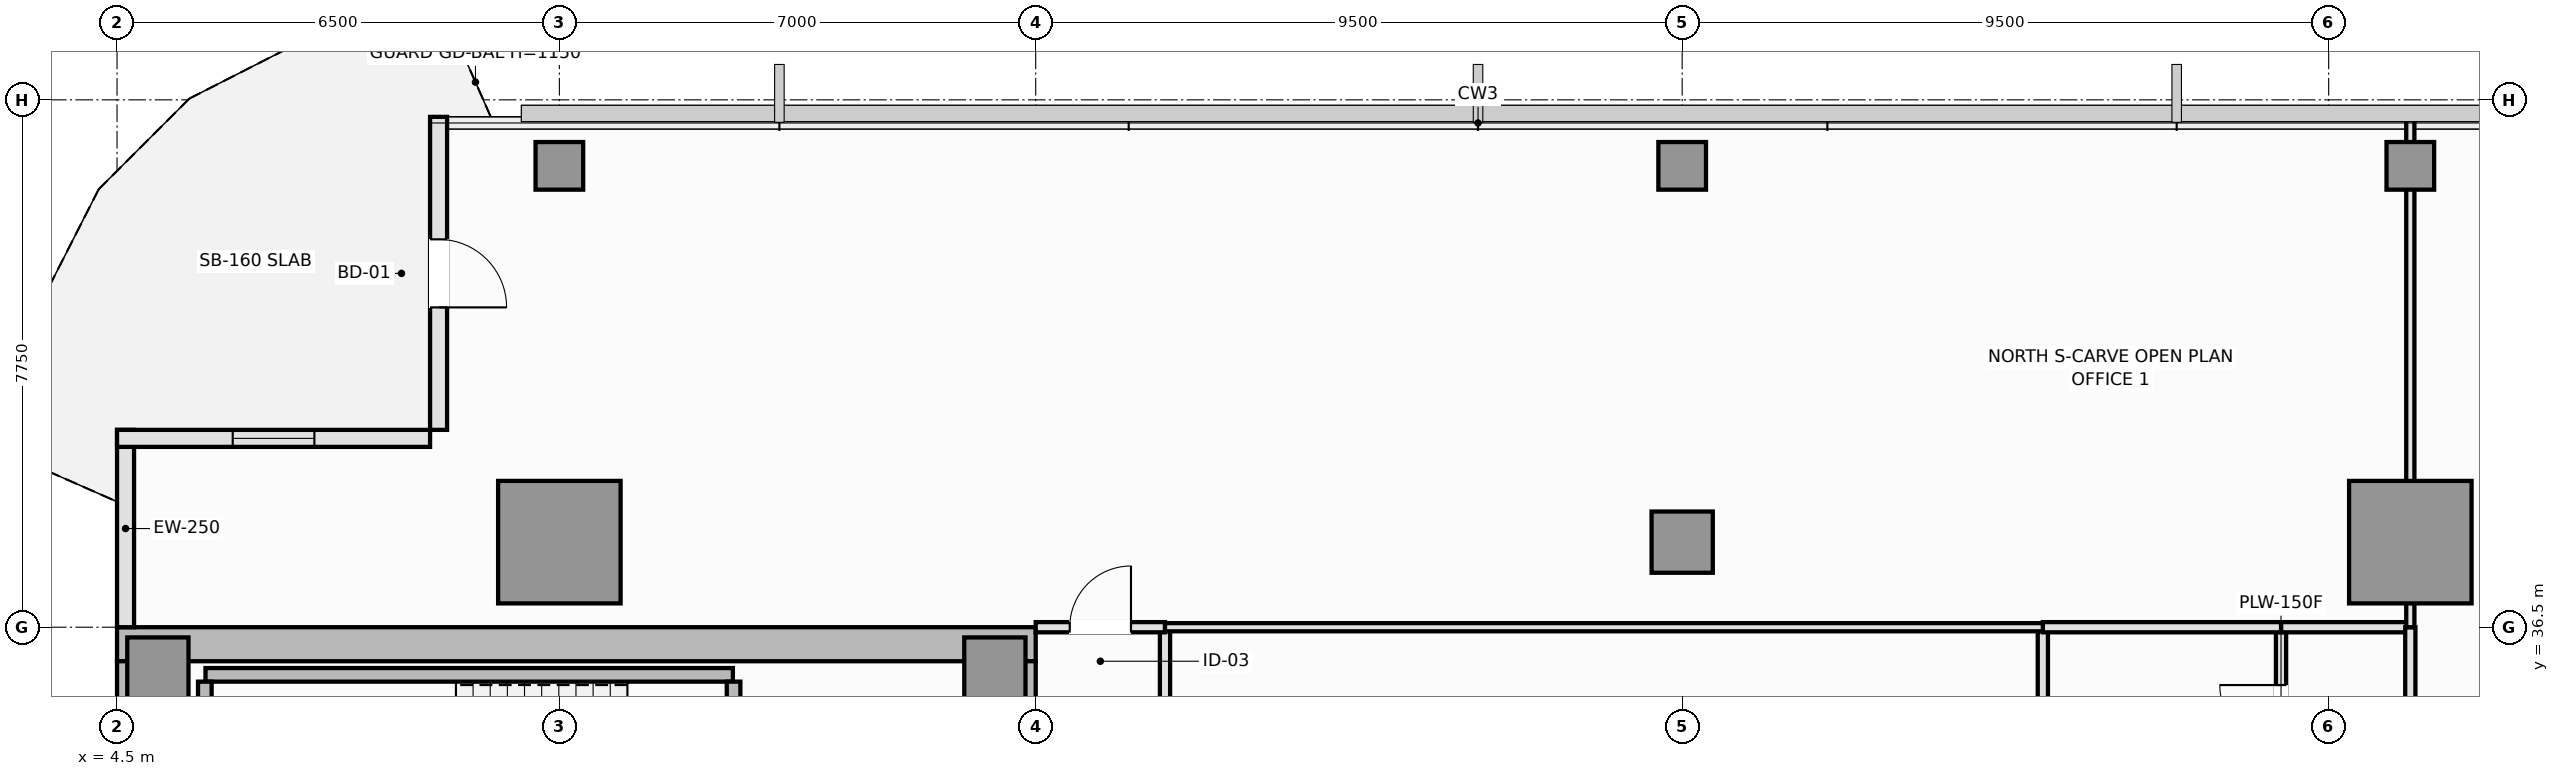
"""IFC4 building model, lengths in metres.
Left out: names, types, materials, properties, quantities, classifications, styles, units other than length and angle.
Written with IfcOpenShell. Run it as: python <this file> out.ifc"""

import sys

from ifc_helpers import new_model, si_unit, direction, frame, frame_2d, origin, origin_2d, place, context, subcontext, project, spatial, rectangle, extrude, element, fill, save


model = new_model("IFC4")
c1 = context("Model", 3, precision=1e-05, world=origin(), true_north=direction((0.0, 1.0)))
c2 = subcontext(c1, "Body", "Model", "MODEL_VIEW")
j1 = project(units=[si_unit("LENGTHUNIT", "METRE"), si_unit("PLANEANGLEUNIT", "RADIAN")], contexts=[c1])
p1 = place(None, origin())
s1 = spatial("IfcSite", under=j1, at=p1, CompositionType="ELEMENT")
p2 = place(p1, origin())
s2 = spatial("IfcBuilding", under=s1, at=p2, CompositionType="ELEMENT")
p3 = place(p2, frame((0.0, 0.0, 249.25)))
s3 = spatial("IfcBuildingStorey", under=s2, at=p3, CompositionType="ELEMENT", Elevation=249.25)
p4 = place(p3, frame((4.5, 36.25, 0.0), z_axis=(0.0, 0.0, 1.0), x_axis=(1.0, 0.0, 0.0)))
e1 = element("IfcWall", 1, at=p4, inside=s3, PredefinedType="SHEAR", context=c2, shape_type="SweptSolid", body=[
    extrude(rectangle(XDim=13.5, YDim=0.5, at=frame_2d((6.75, 0.0))), origin(), (0.0, 0.0, 1.0), 3.55),
])
p5 = place(p3, frame((4.75, 14.5, 0.0), z_axis=(0.0, 0.0, 1.0), x_axis=(0.0, 1.0, 0.0)))
e2 = element("IfcWall", 2, at=p5, inside=s3, PredefinedType="SHEAR", context=c2, shape_type="SweptSolid", body=[
    extrude(rectangle(XDim=21.5, YDim=0.5, at=frame_2d((10.75, 0.0))), origin(), (0.0, 0.0, 1.0), 3.55),
])
p6 = place(p3, frame((17.75, 27.05, 0.0), z_axis=(0.0, 0.0, 1.0), x_axis=(0.0, 1.0, 0.0)))
e3 = element("IfcWall", 3, at=p6, inside=s3, PredefinedType="SHEAR", context=c2, shape_type="SweptSolid", body=[
    extrude(rectangle(XDim=8.95, YDim=0.5, at=frame_2d((4.475, 0.0))), origin(), (0.0, 0.0, 1.0), 3.55),
])
p7 = place(p6, frame((3.45, 0.0, 0.0)))
e4 = element("IfcOpeningElement", 4, at=p7, cuts=e3, PredefinedType="OPENING", context=c2, shape_type="SweptSolid", body=[
    extrude(rectangle(XDim=1.1, YDim=2.15, at=frame_2d((0.55, 1.075))), frame((0.0, 0.26, 0.0), z_axis=(0.0, -1.0, 0.0), x_axis=(1.0, 0.0, 0.0)), (0.0, 0.0, 1.0), 0.52),
])
for number, where, z_axis, x_axis in (
    (5, (5.1, 35.9, 0.0), (0.0, 0.0, 1.0), (1.0, 0.0, 0.0)),
    (6, (17.4, 35.9, 0.0), (0.0, 0.0, 1.0), (1.0, 0.0, 0.0)),
):
    element("IfcColumn", number, at=place(p3, frame(where, z_axis=z_axis, x_axis=x_axis)), inside=s3, PredefinedType="PILASTER", context=c2, shape_type="SweptSolid", body=[
        extrude(rectangle(XDim=0.9, YDim=0.9, at=origin_2d()), origin(), (0.0, 0.0, 1.0), 3.55),
    ])
for number, where, z_axis, x_axis in (
    (7, (11.0, 37.75, 0.0), (0.0, 0.0, 1.0), (1.0, 0.0, 0.0)),
    (8, (38.2, 37.75, 0.0), (0.0, 0.0, 1.0), (1.0, 0.0, 0.0)),
):
    element("IfcColumn", number, at=place(p3, frame(where, z_axis=z_axis, x_axis=x_axis)), inside=s3, PredefinedType="COLUMN", context=c2, shape_type="SweptSolid", body=[
        extrude(rectangle(XDim=1.8, YDim=1.8, at=origin_2d()), origin(), (0.0, 0.0, 1.0), 3.55),
    ])
p8 = place(p3, frame((27.5, 37.75, 0.0), z_axis=(0.0, 0.0, 1.0), x_axis=(1.0, 0.0, 0.0)))
e9 = element("IfcColumn", 9, at=p8, inside=s3, PredefinedType="COLUMN", context=c2, shape_type="SweptSolid", body=[
    extrude(rectangle(XDim=0.9, YDim=0.9, at=origin_2d()), origin(), (0.0, 0.0, 1.0), 3.55),
])
for number, where, z_axis, x_axis in (
    (10, (11.0, 43.28, 0.0), (0.0, 0.0, 1.0), (1.0, 0.0, 0.0)),
    (11, (27.5, 43.28, 0.0), (0.0, 0.0, 1.0), (1.0, 0.0, 0.0)),
    (12, (38.2, 43.28, 0.0), (0.0, 0.0, 1.0), (1.0, 0.0, 0.0)),
):
    element("IfcColumn", number, at=place(p3, frame(where, z_axis=z_axis, x_axis=x_axis)), inside=s3, PredefinedType="COLUMN", context=c2, shape_type="SweptSolid", body=[
        extrude(rectangle(XDim=0.7, YDim=0.7, at=origin_2d()), origin(), (0.0, 0.0, 1.0), 3.55),
    ])
p9 = place(p3, frame((4.625, 39.4, 0.0), z_axis=(0.0, 0.0, 1.0), x_axis=(0.0, -1.0, 0.0)))
e13 = element("IfcWall", 13, at=p9, inside=s3, PredefinedType="SOLIDWALL", context=c2, shape_type="SweptSolid", body=[
    extrude(rectangle(XDim=2.9, YDim=0.25, at=frame_2d((1.45, 0.0))), origin(), (0.0, 0.0, 1.0), 3.39),
])
p10 = place(p3, frame((9.225, 44.0, 0.0), z_axis=(0.0, 0.0, 1.0), x_axis=(0.0, -1.0, 0.0)))
e14 = element("IfcWall", 14, at=p10, inside=s3, PredefinedType="SOLIDWALL", context=c2, shape_type="SweptSolid", body=[
    extrude(rectangle(XDim=4.6, YDim=0.25, at=frame_2d((2.3, 0.0))), origin(), (0.0, 0.0, 1.0), 3.39),
])
p11 = place(p10, frame((1.8, 0.0, 0.0)))
e15 = element("IfcOpeningElement", 15, at=p11, cuts=e14, PredefinedType="OPENING", context=c2, shape_type="SweptSolid", body=[
    extrude(rectangle(XDim=1.0, YDim=2.2, at=frame_2d((0.5, 1.1))), frame((0.0, 0.135, 0.0), z_axis=(0.0, -1.0, 0.0), x_axis=(1.0, 0.0, 0.0)), (0.0, 0.0, 1.0), 0.27),
])
p12 = place(p3, frame((9.1, 39.275, 0.0), z_axis=(0.0, 0.0, 1.0), x_axis=(-1.0, 0.0, 0.0)))
e16 = element("IfcWall", 16, at=p12, inside=s3, PredefinedType="SOLIDWALL", context=c2, shape_type="SweptSolid", body=[
    extrude(rectangle(XDim=4.6, YDim=0.25, at=frame_2d((2.3, 0.0))), origin(), (0.0, 0.0, 1.0), 3.12),
])
p13 = place(p12, frame((1.7, 0.0, 0.9)))
e17 = element("IfcOpeningElement", 17, at=p13, cuts=e16, PredefinedType="OPENING", context=c2, shape_type="SweptSolid", body=[
    extrude(rectangle(XDim=1.2, YDim=1.8, at=frame_2d((0.6, 0.9))), frame((0.0, 0.135, 0.0), z_axis=(0.0, -1.0, 0.0), x_axis=(1.0, 0.0, 0.0)), (0.0, 0.0, 1.0), 0.27),
])
p14 = place(p3, frame((5.8, 35.8, 0.0), z_axis=(0.0, 0.0, 1.0), x_axis=(1.0, 0.0, 0.0)))
e18 = element("IfcWall", 18, at=p14, inside=s3, PredefinedType="SOLIDWALL", context=c2, shape_type="SweptSolid", body=[
    extrude(rectangle(XDim=7.75, YDim=0.2, at=frame_2d((3.875, 0.0))), origin(), (0.0, 0.0, 1.0), 3.55),
])
p15 = place(p3, frame((5.79, 32.65, 0.0), z_axis=(0.0, 0.0, 1.0), x_axis=(0.0, 1.0, 0.0)))
e19 = element("IfcWall", 19, at=p15, inside=s3, PredefinedType="SOLIDWALL", context=c2, shape_type="SweptSolid", body=[
    extrude(rectangle(XDim=3.05, YDim=0.2, at=frame_2d((1.525, 0.0))), origin(), (0.0, 0.0, 1.0), 3.55),
])
p16 = place(p3, frame((13.56, 32.65, 0.0), z_axis=(0.0, 0.0, 1.0), x_axis=(0.0, 1.0, 0.0)))
e20 = element("IfcWall", 20, at=p16, inside=s3, PredefinedType="SOLIDWALL", context=c2, shape_type="SweptSolid", body=[
    extrude(rectangle(XDim=3.05, YDim=0.2, at=frame_2d((1.525, 0.0))), origin(), (0.0, 0.0, 1.0), 3.55),
])
p17 = place(p16, frame((0.95, 0.0, 0.0)))
e21 = element("IfcOpeningElement", 21, at=p17, cuts=e20, PredefinedType="OPENING", context=c2, shape_type="SweptSolid", body=[
    extrude(rectangle(XDim=1.15, YDim=2.15, at=frame_2d((0.575, 1.075))), frame((0.0, 0.11, 0.0), z_axis=(0.0, -1.0, 0.0), x_axis=(1.0, 0.0, 0.0)), (0.0, 0.0, 1.0), 0.22),
])
p18 = place(p3, frame((19.9, 32.6, 0.0), z_axis=(0.0, 0.0, 1.0), x_axis=(0.0, 1.0, 0.0)))
e22 = element("IfcWall", 22, at=p18, inside=s3, PredefinedType="PARTITIONING", context=c2, shape_type="SweptSolid", body=[
    extrude(rectangle(XDim=3.9, YDim=0.15, at=frame_2d((1.95, 0.0))), origin(), (0.0, 0.0, 1.0), 3.39),
])
p19 = place(p18, frame((1.45, 0.0, 0.0)))
e23 = element("IfcOpeningElement", 23, at=p19, cuts=e22, PredefinedType="OPENING", context=c2, shape_type="SweptSolid", body=[
    extrude(rectangle(XDim=1.0, YDim=2.15, at=frame_2d((0.5, 1.075))), frame((0.0, 0.085, 0.0), z_axis=(0.0, -1.0, 0.0), x_axis=(1.0, 0.0, 0.0)), (0.0, 0.0, 1.0), 0.17),
])
p20 = place(p3, frame((18.0, 36.5, 0.0), z_axis=(0.0, 0.0, 1.0), x_axis=(1.0, 0.0, 0.0)))
e24 = element("IfcWall", 24, at=p20, inside=s3, PredefinedType="PARTITIONING", context=c2, shape_type="SweptSolid", body=[
    extrude(rectangle(XDim=1.9, YDim=0.15, at=frame_2d((0.95, 0.0))), origin(), (0.0, 0.0, 1.0), 3.39),
])
p21 = place(p20, frame((0.5, 0.0, 0.0)))
e25 = element("IfcOpeningElement", 25, at=p21, cuts=e24, PredefinedType="OPENING", context=c2, shape_type="SweptSolid", body=[
    extrude(rectangle(XDim=0.9, YDim=2.1, at=frame_2d((0.45, 1.05))), frame((0.0, 0.085, 0.0), z_axis=(0.0, -1.0, 0.0), x_axis=(1.0, 0.0, 0.0)), (0.0, 0.0, 1.0), 0.17),
])
p22 = place(p3, frame((36.3, 33.9, 0.0), z_axis=(0.0, 0.0, 1.0), x_axis=(0.0, 1.0, 0.0)))
e26 = element("IfcWall", 26, at=p22, inside=s3, PredefinedType="PLUMBINGWALL", context=c2, shape_type="SweptSolid", body=[
    extrude(rectangle(XDim=2.6, YDim=0.15, at=frame_2d((1.3, 0.0))), origin(), (0.0, 0.0, 1.0), 3.39),
])
p23 = place(p22, frame((0.85, 0.0, 0.0)))
e27 = element("IfcOpeningElement", 27, at=p23, cuts=e26, PredefinedType="OPENING", context=c2, shape_type="SweptSolid", body=[
    extrude(rectangle(XDim=0.9, YDim=2.1, at=frame_2d((0.45, 1.05))), frame((0.0, 0.085, 0.0), z_axis=(0.0, -1.0, 0.0), x_axis=(1.0, 0.0, 0.0)), (0.0, 0.0, 1.0), 0.17),
])
p24 = place(p3, frame((36.3, 36.5, 0.0), z_axis=(0.0, 0.0, 1.0), x_axis=(1.0, 0.0, 0.0)))
e28 = element("IfcWall", 28, at=p24, inside=s3, PredefinedType="PARTITIONING", context=c2, shape_type="SweptSolid", body=[
    extrude(rectangle(XDim=1.9, YDim=0.15, at=frame_2d((0.95, 0.0))), origin(), (0.0, 0.0, 1.0), 3.39),
])
p25 = place(p3, frame((38.2, 28.9, 0.0), z_axis=(0.0, 0.0, 1.0), x_axis=(0.0, 1.0, 0.0)))
e29 = element("IfcWall", 29, at=p25, inside=s3, PredefinedType="PARTITIONING", context=c2, shape_type="SweptSolid", body=[
    extrude(rectangle(XDim=7.6, YDim=0.15, at=frame_2d((3.8, 0.0))), origin(), (0.0, 0.0, 1.0), 2.99),
])
p26 = place(p25, frame((3.894, 0.0, 0.0)))
e30 = element("IfcOpeningElement", 30, at=p26, cuts=e29, PredefinedType="OPENING", context=c2, shape_type="SweptSolid", body=[
    extrude(rectangle(XDim=1.0, YDim=2.15, at=frame_2d((0.5, 1.075))), frame((0.0, 0.085, 0.0), z_axis=(0.0, -1.0, 0.0), x_axis=(1.0, 0.0, 0.0)), (0.0, 0.0, 1.0), 0.17),
])
p27 = place(p3, frame((32.8, 33.9, 0.0), z_axis=(0.0, 0.0, 1.0), x_axis=(0.0, 1.0, 0.0)))
e31 = element("IfcWall", 31, at=p27, inside=s3, PredefinedType="PLUMBINGWALL", context=c2, shape_type="SweptSolid", body=[
    extrude(rectangle(XDim=2.6, YDim=0.15, at=frame_2d((1.3, 0.0))), origin(), (0.0, 0.0, 1.0), 3.39),
])
p28 = place(p3, frame((32.8, 36.5, 0.0), z_axis=(0.0, 0.0, 1.0), x_axis=(1.0, 0.0, 0.0)))
e32 = element("IfcWall", 32, at=p28, inside=s3, PredefinedType="PLUMBINGWALL", context=c2, shape_type="SweptSolid", body=[
    extrude(rectangle(XDim=3.5, YDim=0.15, at=frame_2d((1.75, 0.0))), origin(), (0.0, 0.0, 1.0), 3.39),
])
p29 = place(p3, frame((19.9, 36.5, 0.0), z_axis=(0.0, 0.0, 1.0), x_axis=(1.0, 0.0, 0.0)))
e33 = element("IfcWall", 33, at=p29, inside=s3, PredefinedType="PARTITIONING", context=c2, shape_type="SweptSolid", body=[
    extrude(rectangle(XDim=12.9, YDim=0.12, at=frame_2d((6.45, 0.0))), origin(), (0.0, 0.0, 1.0), 3.39),
])
p30 = place(p3, frame((38.2, 36.5, 0.0), z_axis=(0.0, 0.0, 1.0), x_axis=(0.0, 1.0, 0.0)))
e34 = element("IfcWall", 34, at=p30, inside=s3, PredefinedType="PARTITIONING", context=c2, shape_type="SweptSolid", body=[
    extrude(rectangle(XDim=7.49, YDim=0.12, at=frame_2d((3.745, 0.0))), origin(), (0.0, 0.0, 1.0), 2.99),
])
p31 = place(p11, frame((1.0, 0.0, 0.0), z_axis=(0.0, 0.0, 1.0), x_axis=(-1.0, 0.0, 0.0)))
e35 = element("IfcDoor", 35, at=p31, inside=s3, OperationType="SINGLE_SWING_RIGHT", PredefinedType="DOOR", context=c2, shape_type="SweptSolid", body=[
    extrude(rectangle(XDim=1.0, YDim=2.2, at=frame_2d((0.5, 1.1))), frame((0.0, 0.025, 0.0), z_axis=(0.0, -1.0, 0.0), x_axis=(1.0, 0.0, 0.0)), (0.0, 0.0, 1.0), 0.05),
])
fill(e15, e35)
p32 = place(p13, origin())
e36 = element("IfcWindow", 36, at=p32, inside=s3, PartitioningType="SINGLE_PANEL", PredefinedType="WINDOW", context=c2, shape_type="SweptSolid", body=[
    extrude(rectangle(XDim=1.2, YDim=1.8, at=frame_2d((0.6, 0.9))), frame((0.0, 0.03, 0.0), z_axis=(0.0, -1.0, 0.0), x_axis=(1.0, 0.0, 0.0)), (0.0, 0.0, 1.0), 0.06),
])
fill(e17, e36)
p33 = place(p21, origin())
e37 = element("IfcDoor", 37, at=p33, inside=s3, OperationType="SINGLE_SWING_RIGHT", PredefinedType="DOOR", context=c2, shape_type="SweptSolid", body=[
    extrude(rectangle(XDim=0.9, YDim=2.1, at=frame_2d((0.45, 1.05))), frame((0.0, 0.025, 0.0), z_axis=(0.0, -1.0, 0.0), x_axis=(1.0, 0.0, 0.0)), (0.0, 0.0, 1.0), 0.05),
])
fill(e25, e37)
p34 = place(p23, origin())
e38 = element("IfcDoor", 38, at=p34, inside=s3, OperationType="SINGLE_SWING_RIGHT", PredefinedType="DOOR", context=c2, shape_type="SweptSolid", body=[
    extrude(rectangle(XDim=0.9, YDim=2.1, at=frame_2d((0.45, 1.05))), frame((0.0, 0.025, 0.0), z_axis=(0.0, -1.0, 0.0), x_axis=(1.0, 0.0, 0.0)), (0.0, 0.0, 1.0), 0.05),
])
fill(e27, e38)
save(model, sys.argv[1])
